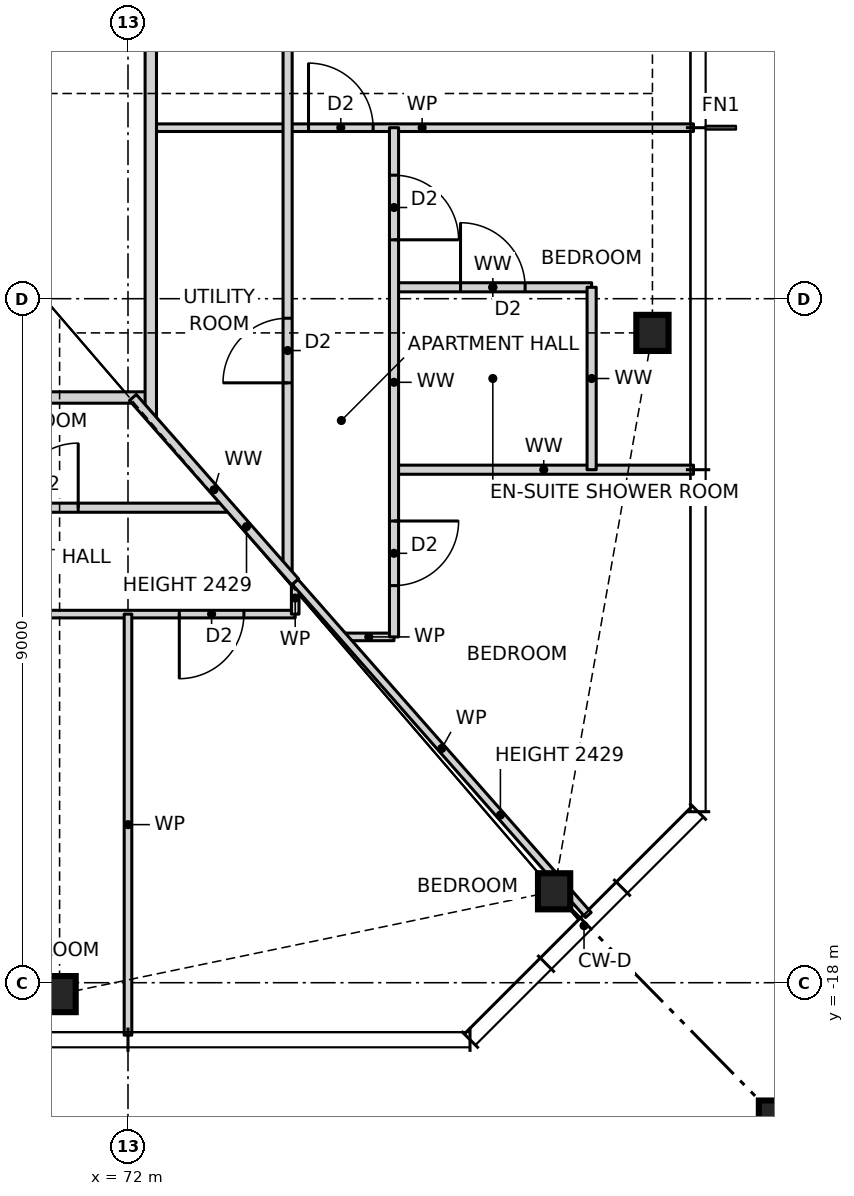
"""IFC4 building model, lengths in metres.
Left out: names, types, materials, properties, quantities, classifications, styles, units other than length and angle.
Written with IfcOpenShell. Run it as: python <this file> out.ifc"""

import sys

from ifc_helpers import new_model, si_unit, direction, frame, frame_2d, origin, origin_2d, place, context, subcontext, project, spatial, rectangle, hollow_rectangle, i_section, extrude, element, fill, save


model = new_model("IFC4")
c1 = context("Model", 3, precision=1e-05, world=origin(), true_north=direction((0.0, 1.0)))
c2 = subcontext(c1, "Body", "Model", "MODEL_VIEW")
j1 = project(units=[si_unit("LENGTHUNIT", "METRE"), si_unit("PLANEANGLEUNIT", "RADIAN")], contexts=[c1])
p1 = place(None, origin())
s1 = spatial("IfcSite", under=j1, at=p1, CompositionType="ELEMENT")
p2 = place(p1, origin())
s2 = spatial("IfcBuilding", under=s1, at=p2, CompositionType="ELEMENT")
p3 = place(p2, frame((0.0, 0.0, 53.5)))
s3 = spatial("IfcBuildingStorey", under=s2, at=p3, CompositionType="ELEMENT", Elevation=53.5)
for number, where, z_axis, x_axis in (
    (1, (71.1, -18.15, 0.0), (0.0, 0.0, 1.0), (1.0, 0.0, 0.0)),
    (2, (77.606, -16.797, 0.0), (0.0, 0.0, 1.0), (1.0, 0.0, 0.0)),
    (3, (78.9, -9.45, 0.0), (0.0, 0.0, 1.0), (1.0, 0.0, 0.0)),
):
    element("IfcColumn", number, at=place(p3, frame(where, z_axis=z_axis, x_axis=x_axis)), inside=s3, PredefinedType="COLUMN", context=c2, shape_type="SweptSolid", body=[
        extrude(i_section(OverallWidth=0.424, OverallDepth=0.475, WebThickness=0.048, FlangeThickness=0.077, at=origin_2d()), origin(), (0.0, 0.0, 1.0), 3.5),
    ])
p4 = place(p3, frame((80.9, -20.15, 0.0), z_axis=(0.0, 0.0, 1.0), x_axis=(1.0, 0.0, 0.0)))
e4 = element("IfcColumn", 4, at=p4, inside=s3, PredefinedType="COLUMN", context=c2, shape_type="SweptSolid", body=[
    extrude(hollow_rectangle(XDim=1.2, YDim=1.2, WallThickness=0.07, at=origin_2d()), origin(), (0.0, 0.0, 1.0), 3.5),
])
p5 = place(p3, frame((74.836, -13.45, 0.0), z_axis=(0.0, 0.0, 1.0), x_axis=(1.0, 0.0, 0.0)))
e5 = element("IfcWall", 5, at=p5, inside=s3, PredefinedType="PARTITIONING", context=c2, shape_type="SweptSolid", body=[
    extrude(rectangle(XDim=0.664, YDim=0.1, at=frame_2d((0.332, 0.0))), origin(), (0.0, 0.0, 1.0), 3.27),
])
p6 = place(p3, frame((63.0, -13.15, 0.0), z_axis=(0.0, 0.0, 1.0), x_axis=(1.0, 0.0, 0.0)))
e6 = element("IfcWall", 6, at=p6, inside=s3, PredefinedType="PARTITIONING", context=c2, shape_type="SweptSolid", body=[
    extrude(rectangle(XDim=11.2, YDim=0.1, at=frame_2d((5.6, 0.0))), origin(), (0.0, 0.0, 1.0), 3.27),
])
p7 = place(p6, frame((1.825, 0.0, 0.0)))
e7 = element("IfcOpeningElement", 7, at=p7, cuts=e6, PredefinedType="OPENING", context=c2, shape_type="SweptSolid", body=[
    extrude(rectangle(XDim=0.85, YDim=2.1, at=frame_2d((0.425, 1.05))), frame((0.0, 0.06, 0.0), z_axis=(0.0, -1.0, 0.0), x_axis=(1.0, 0.0, 0.0)), (0.0, 0.0, 1.0), 0.12),
])
p8 = place(p6, frame((6.325, 0.0, 0.0)))
e8 = element("IfcOpeningElement", 8, at=p8, cuts=e6, PredefinedType="OPENING", context=c2, shape_type="SweptSolid", body=[
    extrude(rectangle(XDim=0.85, YDim=2.1, at=frame_2d((0.425, 1.05))), frame((0.0, 0.06, 0.0), z_axis=(0.0, -1.0, 0.0), x_axis=(1.0, 0.0, 0.0)), (0.0, 0.0, 1.0), 0.12),
])
p9 = place(p6, frame((9.675, 0.0, 0.0)))
e9 = element("IfcOpeningElement", 9, at=p9, cuts=e6, PredefinedType="OPENING", context=c2, shape_type="SweptSolid", body=[
    extrude(rectangle(XDim=0.85, YDim=2.1, at=frame_2d((0.425, 1.05))), frame((0.0, 0.06, 0.0), z_axis=(0.0, -1.0, 0.0), x_axis=(1.0, 0.0, 0.0)), (0.0, 0.0, 1.0), 0.12),
])
p10 = place(p3, frame((54.0, -11.75, 0.0), z_axis=(0.0, 0.0, 1.0), x_axis=(1.0, 0.0, 0.0)))
e10 = element("IfcWall", 10, at=p10, inside=s3, PredefinedType="PARTITIONING", context=c2, shape_type="SweptSolid", body=[
    extrude(rectangle(XDim=19.34, YDim=0.12, at=frame_2d((9.67, 0.0))), origin(), (0.0, 0.0, 1.0), 3.27),
])
p11 = place(p10, frame((1.375, 0.0, 0.0)))
e11 = element("IfcOpeningElement", 11, at=p11, cuts=e10, PredefinedType="OPENING", context=c2, shape_type="SweptSolid", body=[
    extrude(rectangle(XDim=0.85, YDim=2.1, at=frame_2d((0.425, 1.05))), frame((0.0, 0.07, 0.0), z_axis=(0.0, -1.0, 0.0), x_axis=(1.0, 0.0, 0.0)), (0.0, 0.0, 1.0), 0.14),
])
p12 = place(p10, frame((4.575, 0.0, 0.0)))
e12 = element("IfcOpeningElement", 12, at=p12, cuts=e10, PredefinedType="OPENING", context=c2, shape_type="SweptSolid", body=[
    extrude(rectangle(XDim=0.85, YDim=2.1, at=frame_2d((0.425, 1.05))), frame((0.0, 0.07, 0.0), z_axis=(0.0, -1.0, 0.0), x_axis=(1.0, 0.0, 0.0)), (0.0, 0.0, 1.0), 0.14),
])
p13 = place(p10, frame((11.325, 0.0, 0.0)))
e13 = element("IfcOpeningElement", 13, at=p13, cuts=e10, PredefinedType="OPENING", context=c2, shape_type="SweptSolid", body=[
    extrude(rectangle(XDim=0.85, YDim=2.1, at=frame_2d((0.425, 1.05))), frame((0.0, 0.07, 0.0), z_axis=(0.0, -1.0, 0.0), x_axis=(1.0, 0.0, 0.0)), (0.0, 0.0, 1.0), 0.14),
])
p14 = place(p10, frame((16.495, 0.0, 0.0)))
e14 = element("IfcOpeningElement", 14, at=p14, cuts=e10, PredefinedType="OPENING", context=c2, shape_type="SweptSolid", body=[
    extrude(rectangle(XDim=0.85, YDim=2.1, at=frame_2d((0.425, 1.05))), frame((0.0, 0.07, 0.0), z_axis=(0.0, -1.0, 0.0), x_axis=(1.0, 0.0, 0.0)), (0.0, 0.0, 1.0), 0.14),
])
p15 = place(p3, frame((75.5, -11.25, 0.0), z_axis=(0.0, 0.0, 1.0), x_axis=(1.0, 0.0, 0.0)))
e15 = element("IfcWall", 15, at=p15, inside=s3, PredefinedType="PARTITIONING", context=c2, shape_type="SweptSolid", body=[
    extrude(rectangle(XDim=3.94, YDim=0.12, at=frame_2d((1.97, 0.0))), origin(), (0.0, 0.0, 1.0), 3.27),
])
p16 = place(p3, frame((53.7, -10.3, 0.0), z_axis=(0.0, 0.0, 1.0), x_axis=(1.0, 0.0, 0.0)))
e16 = element("IfcWall", 16, at=p16, inside=s3, PredefinedType="PARTITIONING", context=c2, shape_type="SweptSolid", body=[
    extrude(rectangle(XDim=18.6, YDim=0.15, at=frame_2d((9.3, 0.0))), origin(), (0.0, 0.0, 1.0), 3.27),
])
p17 = place(p16, frame((4.8, 0.0, 0.0)))
e17 = element("IfcOpeningElement", 17, at=p17, cuts=e16, PredefinedType="OPENING", context=c2, shape_type="SweptSolid", body=[
    extrude(rectangle(XDim=1.0, YDim=2.1, at=frame_2d((0.5, 1.05))), frame((0.0, 0.085, 0.0), z_axis=(0.0, -1.0, 0.0), x_axis=(1.0, 0.0, 0.0)), (0.0, 0.0, 1.0), 0.17),
])
p18 = place(p3, frame((75.5, -8.85, 0.0), z_axis=(0.0, 0.0, 1.0), x_axis=(1.0, 0.0, 0.0)))
e18 = element("IfcWall", 18, at=p18, inside=s3, PredefinedType="PARTITIONING", context=c2, shape_type="SweptSolid", body=[
    extrude(rectangle(XDim=2.6, YDim=0.12, at=frame_2d((1.3, 0.0))), origin(), (0.0, 0.0, 1.0), 3.27),
])
p19 = place(p18, frame((0.875, 0.0, 0.0)))
e19 = element("IfcOpeningElement", 19, at=p19, cuts=e18, PredefinedType="OPENING", context=c2, shape_type="SweptSolid", body=[
    extrude(rectangle(XDim=0.85, YDim=2.1, at=frame_2d((0.425, 1.05))), frame((0.0, 0.07, 0.0), z_axis=(0.0, -1.0, 0.0), x_axis=(1.0, 0.0, 0.0)), (0.0, 0.0, 1.0), 0.14),
])
p20 = place(p3, frame((72.3, -6.75, 0.0), z_axis=(0.0, 0.0, 1.0), x_axis=(1.0, 0.0, 0.0)))
e20 = element("IfcWall", 20, at=p20, inside=s3, PredefinedType="PARTITIONING", context=c2, shape_type="SweptSolid", body=[
    extrude(rectangle(XDim=7.14, YDim=0.1, at=frame_2d((3.57, 0.0))), origin(), (0.0, 0.0, 1.0), 3.27),
])
p21 = place(p20, frame((2.075, 0.0, 0.0)))
e21 = element("IfcOpeningElement", 21, at=p21, cuts=e20, PredefinedType="OPENING", context=c2, shape_type="SweptSolid", body=[
    extrude(rectangle(XDim=0.85, YDim=2.1, at=frame_2d((0.425, 1.05))), frame((0.0, 0.06, 0.0), z_axis=(0.0, -1.0, 0.0), x_axis=(1.0, 0.0, 0.0)), (0.0, 0.0, 1.0), 0.12),
])
p22 = place(p3, frame((78.1, -11.25, 0.0), z_axis=(0.0, 0.0, 1.0), x_axis=(0.0, 1.0, 0.0)))
e22 = element("IfcWall", 22, at=p22, inside=s3, PredefinedType="PARTITIONING", context=c2, shape_type="SweptSolid", body=[
    extrude(rectangle(XDim=2.4, YDim=0.12, at=frame_2d((1.2, 0.0))), origin(), (0.0, 0.0, 1.0), 3.27),
])
p23 = place(p3, frame((75.5, -13.45, 0.0), z_axis=(0.0, 0.0, 1.0), x_axis=(0.0, 1.0, 0.0)))
e23 = element("IfcWall", 23, at=p23, inside=s3, PredefinedType="PARTITIONING", context=c2, shape_type="SweptSolid", body=[
    extrude(rectangle(XDim=6.7, YDim=0.12, at=frame_2d((3.35, 0.0))), origin(), (0.0, 0.0, 1.0), 3.27),
])
p24 = place(p23, frame((5.225, 0.0, 0.0)))
e24 = element("IfcOpeningElement", 24, at=p24, cuts=e23, PredefinedType="OPENING", context=c2, shape_type="SweptSolid", body=[
    extrude(rectangle(XDim=0.85, YDim=2.1, at=frame_2d((0.425, 1.05))), frame((0.0, 0.07, 0.0), z_axis=(0.0, -1.0, 0.0), x_axis=(1.0, 0.0, 0.0)), (0.0, 0.0, 1.0), 0.14),
])
p25 = place(p23, frame((0.675, 0.0, 0.0)))
e25 = element("IfcOpeningElement", 25, at=p25, cuts=e23, PredefinedType="OPENING", context=c2, shape_type="SweptSolid", body=[
    extrude(rectangle(XDim=0.85, YDim=2.1, at=frame_2d((0.425, 1.05))), frame((0.0, 0.07, 0.0), z_axis=(0.0, -1.0, 0.0), x_axis=(1.0, 0.0, 0.0)), (0.0, 0.0, 1.0), 0.14),
])
p26 = place(p3, frame((74.2, -13.15, 0.0), z_axis=(0.0, 0.0, 1.0), x_axis=(0.0, 1.0, 0.0)))
e26 = element("IfcWall", 26, at=p26, inside=s3, PredefinedType="PARTITIONING", context=c2, shape_type="SweptSolid", body=[
    extrude(rectangle(XDim=0.423, YDim=0.1, at=frame_2d((0.211, 0.0))), origin(), (0.0, 0.0, 1.0), 3.27),
])
p27 = place(p3, frame((74.1, -12.614, 0.0), z_axis=(0.0, 0.0, 1.0), x_axis=(0.0, 1.0, 0.0)))
e27 = element("IfcWall", 27, at=p27, inside=s3, PredefinedType="PARTITIONING", context=c2, shape_type="SweptSolid", body=[
    extrude(rectangle(XDim=25.228, YDim=0.12, at=frame_2d((12.614, 0.0))), origin(), (0.0, 0.0, 1.0), 3.27),
])
p28 = place(p27, frame((7.239, 0.0, 0.0)))
e28 = element("IfcOpeningElement", 28, at=p28, cuts=e27, PredefinedType="OPENING", context=c2, shape_type="SweptSolid", body=[
    extrude(rectangle(XDim=0.85, YDim=2.1, at=frame_2d((0.425, 1.05))), frame((0.0, 0.07, 0.0), z_axis=(0.0, -1.0, 0.0), x_axis=(1.0, 0.0, 0.0)), (0.0, 0.0, 1.0), 0.14),
])
p29 = place(p27, frame((10.439, 0.0, 0.0)))
e29 = element("IfcOpeningElement", 29, at=p29, cuts=e27, PredefinedType="OPENING", context=c2, shape_type="SweptSolid", body=[
    extrude(rectangle(XDim=0.85, YDim=2.1, at=frame_2d((0.425, 1.05))), frame((0.0, 0.07, 0.0), z_axis=(0.0, -1.0, 0.0), x_axis=(1.0, 0.0, 0.0)), (0.0, 0.0, 1.0), 0.14),
])
p30 = place(p27, frame((2.507, 0.0, 0.0)))
e30 = element("IfcOpeningElement", 30, at=p30, cuts=e27, PredefinedType="OPENING", context=c2, shape_type="SweptSolid", body=[
    extrude(rectangle(XDim=0.85, YDim=2.1, at=frame_2d((0.425, 1.05))), frame((0.0, 0.07, 0.0), z_axis=(0.0, -1.0, 0.0), x_axis=(1.0, 0.0, 0.0)), (0.0, 0.0, 1.0), 0.14),
])
p31 = place(p27, frame((16.639, 0.0, 0.0)))
e31 = element("IfcOpeningElement", 31, at=p31, cuts=e27, PredefinedType="OPENING", context=c2, shape_type="SweptSolid", body=[
    extrude(rectangle(XDim=0.85, YDim=2.1, at=frame_2d((0.425, 1.05))), frame((0.0, 0.07, 0.0), z_axis=(0.0, -1.0, 0.0), x_axis=(1.0, 0.0, 0.0)), (0.0, 0.0, 1.0), 0.14),
])
p32 = place(p27, frame((21.821, 0.0, 0.0)))
e32 = element("IfcOpeningElement", 32, at=p32, cuts=e27, PredefinedType="OPENING", context=c2, shape_type="SweptSolid", body=[
    extrude(rectangle(XDim=0.85, YDim=2.1, at=frame_2d((0.425, 1.05))), frame((0.0, 0.07, 0.0), z_axis=(0.0, -1.0, 0.0), x_axis=(1.0, 0.0, 0.0)), (0.0, 0.0, 1.0), 0.14),
])
p33 = place(p3, frame((72.3, -10.568, 0.0), z_axis=(0.0, 0.0, 1.0), x_axis=(0.0, 1.0, 0.0)))
e33 = element("IfcWall", 33, at=p33, inside=s3, PredefinedType="PARTITIONING", context=c2, shape_type="SweptSolid", body=[
    extrude(rectangle(XDim=21.136, YDim=0.15, at=frame_2d((10.568, 0.0))), origin(), (0.0, 0.0, 1.0), 3.27),
])
p34 = place(p33, frame((8.318, 0.0, 0.0)))
e34 = element("IfcOpeningElement", 34, at=p34, cuts=e33, PredefinedType="OPENING", context=c2, shape_type="SweptSolid", body=[
    extrude(rectangle(XDim=1.0, YDim=2.1, at=frame_2d((0.5, 1.05))), frame((0.0, 0.085, 0.0), z_axis=(0.0, -1.0, 0.0), x_axis=(1.0, 0.0, 0.0)), (0.0, 0.0, 1.0), 0.17),
])
p35 = place(p3, frame((72.0, -18.69, 0.0), z_axis=(0.0, 0.0, 1.0), x_axis=(0.0, 1.0, 0.0)))
e35 = element("IfcWall", 35, at=p35, inside=s3, PredefinedType="PARTITIONING", context=c2, shape_type="SweptSolid", body=[
    extrude(rectangle(XDim=5.54, YDim=0.1, at=frame_2d((2.77, 0.0))), origin(), (0.0, 0.0, 1.0), 3.27),
])
p36 = place(p3, frame((74.2, -12.727, 0.0), z_axis=(0.0, 0.0, 1.0), x_axis=(-0.660667046586, 0.75067906162, 0.0)))
e36 = element("IfcWall", 36, at=p36, inside=s3, PredefinedType="PARTITIONING", context=c2, shape_type="SweptSolid", body=[
    extrude(rectangle(XDim=3.233, YDim=0.12, at=frame_2d((1.617, 0.0))), origin(), (0.0, 0.0, 1.0), 2.429),
])
p37 = place(p3, frame((78.057, -17.109, 0.0), z_axis=(0.0, 0.0, 1.0), x_axis=(-0.660698595885, 0.750651294141, 0.0)))
e37 = element("IfcWall", 37, at=p37, inside=s3, PredefinedType="PARTITIONING", context=c2, shape_type="SweptSolid", body=[
    extrude(rectangle(XDim=5.838, YDim=0.1, at=frame_2d((2.919, 0.0))), origin(), (0.0, 0.0, 1.0), 2.429),
])
p38 = place(p9, frame((0.85, 0.0, 0.0), z_axis=(0.0, 0.0, 1.0), x_axis=(-1.0, 0.0, 0.0)))
e38 = element("IfcDoor", 38, at=p38, inside=s3, OperationType="SINGLE_SWING_RIGHT", PredefinedType="DOOR", context=c2, shape_type="SweptSolid", body=[
    extrude(rectangle(XDim=0.85, YDim=2.1, at=frame_2d((0.425, 1.05))), frame((0.0, 0.025, 0.0), z_axis=(0.0, -1.0, 0.0), x_axis=(1.0, 0.0, 0.0)), (0.0, 0.0, 1.0), 0.05),
])
fill(e9, e38)
p39 = place(p14, origin())
e39 = element("IfcDoor", 39, at=p39, inside=s3, OperationType="SINGLE_SWING_RIGHT", PredefinedType="DOOR", context=c2, shape_type="SweptSolid", body=[
    extrude(rectangle(XDim=0.85, YDim=2.1, at=frame_2d((0.425, 1.05))), frame((0.0, 0.025, 0.0), z_axis=(0.0, -1.0, 0.0), x_axis=(1.0, 0.0, 0.0)), (0.0, 0.0, 1.0), 0.05),
])
fill(e14, e39)
p40 = place(p21, origin())
e40 = element("IfcDoor", 40, at=p40, inside=s3, OperationType="SINGLE_SWING_LEFT", PredefinedType="DOOR", context=c2, shape_type="SweptSolid", body=[
    extrude(rectangle(XDim=0.85, YDim=2.1, at=frame_2d((0.425, 1.05))), frame((0.0, 0.025, 0.0), z_axis=(0.0, -1.0, 0.0), x_axis=(1.0, 0.0, 0.0)), (0.0, 0.0, 1.0), 0.05),
])
fill(e21, e40)
p41 = place(p19, origin())
e41 = element("IfcDoor", 41, at=p41, inside=s3, OperationType="SINGLE_SWING_LEFT", PredefinedType="DOOR", context=c2, shape_type="SweptSolid", body=[
    extrude(rectangle(XDim=0.85, YDim=2.1, at=frame_2d((0.425, 1.05))), frame((0.0, 0.025, 0.0), z_axis=(0.0, -1.0, 0.0), x_axis=(1.0, 0.0, 0.0)), (0.0, 0.0, 1.0), 0.05),
])
fill(e19, e41)
p42 = place(p24, frame((0.85, 0.0, 0.0), z_axis=(0.0, 0.0, 1.0), x_axis=(-1.0, 0.0, 0.0)))
e42 = element("IfcDoor", 42, at=p42, inside=s3, OperationType="SINGLE_SWING_RIGHT", PredefinedType="DOOR", context=c2, shape_type="SweptSolid", body=[
    extrude(rectangle(XDim=0.85, YDim=2.1, at=frame_2d((0.425, 1.05))), frame((0.0, 0.025, 0.0), z_axis=(0.0, -1.0, 0.0), x_axis=(1.0, 0.0, 0.0)), (0.0, 0.0, 1.0), 0.05),
])
fill(e24, e42)
p43 = place(p25, frame((0.85, 0.0, 0.0), z_axis=(0.0, 0.0, 1.0), x_axis=(-1.0, 0.0, 0.0)))
e43 = element("IfcDoor", 43, at=p43, inside=s3, OperationType="SINGLE_SWING_LEFT", PredefinedType="DOOR", context=c2, shape_type="SweptSolid", body=[
    extrude(rectangle(XDim=0.85, YDim=2.1, at=frame_2d((0.425, 1.05))), frame((0.0, 0.025, 0.0), z_axis=(0.0, -1.0, 0.0), x_axis=(1.0, 0.0, 0.0)), (0.0, 0.0, 1.0), 0.05),
])
fill(e25, e43)
p44 = place(p30, origin())
e44 = element("IfcDoor", 44, at=p44, inside=s3, OperationType="SINGLE_SWING_LEFT", PredefinedType="DOOR", context=c2, shape_type="SweptSolid", body=[
    extrude(rectangle(XDim=0.85, YDim=2.1, at=frame_2d((0.425, 1.05))), frame((0.0, 0.025, 0.0), z_axis=(0.0, -1.0, 0.0), x_axis=(1.0, 0.0, 0.0)), (0.0, 0.0, 1.0), 0.05),
])
fill(e30, e44)
save(model, sys.argv[1])
